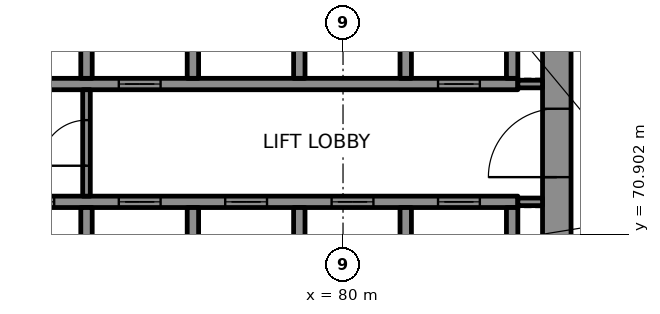
"""IFC4 building model, lengths in metres.
Left out: names, types, materials, properties, quantities, classifications, styles, units other than length and angle.
Written with IfcOpenShell. Run it as: python <this file> out.ifc"""

import sys

from ifc_helpers import new_model, si_unit, direction, frame, frame_2d, origin, place, context, subcontext, project, spatial, rectangle, extrude, element, fill, save


model = new_model("IFC4")
c1 = context("Model", 3, precision=1e-05, world=origin(), true_north=direction((0.0, 1.0)))
c2 = subcontext(c1, "Body", "Model", "MODEL_VIEW")
j1 = project(units=[si_unit("LENGTHUNIT", "METRE"), si_unit("PLANEANGLEUNIT", "RADIAN")], contexts=[c1])
p1 = place(None, origin())
s1 = spatial("IfcSite", under=j1, at=p1, CompositionType="ELEMENT")
p2 = place(p1, origin())
s2 = spatial("IfcBuilding", under=s1, at=p2, CompositionType="ELEMENT")
p3 = place(p2, frame((0.0, 0.0, 175.3)))
s3 = spatial("IfcBuildingStorey", under=s2, at=p3, CompositionType="ELEMENT", Elevation=175.3)
p4 = place(p3, frame((85.625, 67.75, 0.0), z_axis=(0.0, 0.0, 1.0), x_axis=(0.0, 1.0, 0.0)))
e1 = element("IfcWall", 1, at=p4, inside=s3, PredefinedType="SHEAR", context=c2, shape_type="SweptSolid", body=[
    extrude(rectangle(XDim=14.5, YDim=0.75, at=frame_2d((7.25, 0.0))), origin(), (0.0, 0.0, 1.0), 3.7),
])
p5 = place(p4, frame((4.65, 0.0, 0.0)))
e2 = element("IfcOpeningElement", 2, at=p5, cuts=e1, PredefinedType="OPENING", context=c2, shape_type="SweptSolid", body=[
    extrude(rectangle(XDim=1.8, YDim=2.1, at=frame_2d((0.9, 1.05))), frame((0.0, 0.385, 0.0), z_axis=(0.0, -1.0, 0.0), x_axis=(1.0, 0.0, 0.0)), (0.0, 0.0, 1.0), 0.77),
])
p6 = place(p4, frame((11.8, 0.0, 0.0)))
e3 = element("IfcOpeningElement", 3, at=p6, cuts=e1, PredefinedType="OPENING", context=c2, shape_type="SweptSolid", body=[
    extrude(rectangle(XDim=0.9, YDim=2.1, at=frame_2d((0.45, 1.05))), frame((0.0, 0.385, 0.0), z_axis=(0.0, -1.0, 0.0), x_axis=(1.0, 0.0, 0.0)), (0.0, 0.0, 1.0), 0.77),
])
p7 = place(p3, frame((70.3, 71.75, 0.0), z_axis=(0.0, 0.0, 1.0), x_axis=(1.0, 0.0, 0.0)))
e4 = element("IfcWall", 4, at=p7, inside=s3, PredefinedType="SHEAR", context=c2, shape_type="SweptSolid", body=[
    extrude(rectangle(XDim=14.3, YDim=0.3, at=frame_2d((7.15, 0.0))), origin(), (0.0, 0.0, 1.0), 3.7),
])
p8 = place(p7, frame((1.0, 0.0, 0.0)))
e5 = element("IfcOpeningElement", 5, at=p8, cuts=e4, PredefinedType="OPENING", context=c2, shape_type="SweptSolid", body=[
    extrude(rectangle(XDim=1.1, YDim=2.1, at=frame_2d((0.55, 1.05))), frame((0.0, 0.16, 0.0), z_axis=(0.0, -1.0, 0.0), x_axis=(1.0, 0.0, 0.0)), (0.0, 0.0, 1.0), 0.32),
])
p9 = place(p7, frame((3.8, 0.0, 0.0)))
e6 = element("IfcOpeningElement", 6, at=p9, cuts=e4, PredefinedType="OPENING", context=c2, shape_type="SweptSolid", body=[
    extrude(rectangle(XDim=1.1, YDim=2.1, at=frame_2d((0.55, 1.05))), frame((0.0, 0.16, 0.0), z_axis=(0.0, -1.0, 0.0), x_axis=(1.0, 0.0, 0.0)), (0.0, 0.0, 1.0), 0.32),
])
p10 = place(p7, frame((6.6, 0.0, 0.0)))
e7 = element("IfcOpeningElement", 7, at=p10, cuts=e4, PredefinedType="OPENING", context=c2, shape_type="SweptSolid", body=[
    extrude(rectangle(XDim=1.1, YDim=2.1, at=frame_2d((0.55, 1.05))), frame((0.0, 0.16, 0.0), z_axis=(0.0, -1.0, 0.0), x_axis=(1.0, 0.0, 0.0)), (0.0, 0.0, 1.0), 0.32),
])
p11 = place(p7, frame((9.4, 0.0, 0.0)))
e8 = element("IfcOpeningElement", 8, at=p11, cuts=e4, PredefinedType="OPENING", context=c2, shape_type="SweptSolid", body=[
    extrude(rectangle(XDim=1.1, YDim=2.1, at=frame_2d((0.55, 1.05))), frame((0.0, 0.16, 0.0), z_axis=(0.0, -1.0, 0.0), x_axis=(1.0, 0.0, 0.0)), (0.0, 0.0, 1.0), 0.32),
])
p12 = place(p7, frame((12.2, 0.0, 0.0)))
e9 = element("IfcOpeningElement", 9, at=p12, cuts=e4, PredefinedType="OPENING", context=c2, shape_type="SweptSolid", body=[
    extrude(rectangle(XDim=1.1, YDim=2.1, at=frame_2d((0.55, 1.05))), frame((0.0, 0.16, 0.0), z_axis=(0.0, -1.0, 0.0), x_axis=(1.0, 0.0, 0.0)), (0.0, 0.0, 1.0), 0.32),
])
p13 = place(p3, frame((70.3, 74.85, 0.0), z_axis=(0.0, 0.0, 1.0), x_axis=(1.0, 0.0, 0.0)))
e10 = element("IfcWall", 10, at=p13, inside=s3, PredefinedType="SHEAR", context=c2, shape_type="SweptSolid", body=[
    extrude(rectangle(XDim=14.3, YDim=0.3, at=frame_2d((7.15, 0.0))), origin(), (0.0, 0.0, 1.0), 3.7),
])
p14 = place(p13, frame((3.8, 0.0, 0.0)))
e11 = element("IfcOpeningElement", 11, at=p14, cuts=e10, PredefinedType="OPENING", context=c2, shape_type="SweptSolid", body=[
    extrude(rectangle(XDim=1.1, YDim=2.1, at=frame_2d((0.55, 1.05))), frame((0.0, 0.16, 0.0), z_axis=(0.0, -1.0, 0.0), x_axis=(1.0, 0.0, 0.0)), (0.0, 0.0, 1.0), 0.32),
])
p15 = place(p13, frame((12.2, 0.0, 0.0)))
e12 = element("IfcOpeningElement", 12, at=p15, cuts=e10, PredefinedType="OPENING", context=c2, shape_type="SweptSolid", body=[
    extrude(rectangle(XDim=1.1, YDim=2.1, at=frame_2d((0.55, 1.05))), frame((0.0, 0.16, 0.0), z_axis=(0.0, -1.0, 0.0), x_axis=(1.0, 0.0, 0.0)), (0.0, 0.0, 1.0), 0.32),
])
for number, where, z_axis, x_axis in (
    (13, (73.25, 69.0, 0.0), (0.0, 0.0, 1.0), (0.0, 1.0, 0.0)),
    (14, (73.25, 75.0, 0.0), (0.0, 0.0, 1.0), (0.0, 1.0, 0.0)),
    (15, (76.05, 69.0, 0.0), (0.0, 0.0, 1.0), (0.0, 1.0, 0.0)),
    (16, (76.05, 75.0, 0.0), (0.0, 0.0, 1.0), (0.0, 1.0, 0.0)),
    (17, (78.85, 69.0, 0.0), (0.0, 0.0, 1.0), (0.0, 1.0, 0.0)),
    (18, (78.85, 75.0, 0.0), (0.0, 0.0, 1.0), (0.0, 1.0, 0.0)),
    (19, (81.65, 69.0, 0.0), (0.0, 0.0, 1.0), (0.0, 1.0, 0.0)),
    (20, (81.65, 75.0, 0.0), (0.0, 0.0, 1.0), (0.0, 1.0, 0.0)),
    (21, (84.45, 69.0, 0.0), (0.0, 0.0, 1.0), (0.0, 1.0, 0.0)),
    (22, (84.45, 75.0, 0.0), (0.0, 0.0, 1.0), (0.0, 1.0, 0.0)),
):
    element("IfcWall", number, at=place(p3, frame(where, z_axis=z_axis, x_axis=x_axis)), inside=s3, PredefinedType="SHEAR", context=c2, shape_type="SweptSolid", body=[
        extrude(rectangle(XDim=2.6, YDim=0.3, at=frame_2d((1.3, 0.0))), origin(), (0.0, 0.0, 1.0), 3.7),
    ])
for number, where, z_axis, x_axis in (
    (23, (84.6, 71.75, 0.0), (0.0, 0.0, 1.0), (1.0, 0.0, 0.0)),
    (24, (84.6, 74.85, 0.0), (0.0, 0.0, 1.0), (1.0, 0.0, 0.0)),
):
    element("IfcWall", number, at=place(p3, frame(where, z_axis=z_axis, x_axis=x_axis)), inside=s3, PredefinedType="PARTITIONING", context=c2, shape_type="SweptSolid", body=[
        extrude(rectangle(XDim=0.65, YDim=0.2, at=frame_2d((0.325, 0.0))), origin(), (0.0, 0.0, 1.0), 3.7),
    ])
p16 = place(p3, frame((73.25, 71.9, 0.0), z_axis=(0.0, 0.0, 1.0), x_axis=(0.0, 1.0, 0.0)))
e25 = element("IfcWall", 25, at=p16, inside=s3, PredefinedType="PARTITIONING", context=c2, shape_type="SweptSolid", body=[
    extrude(rectangle(XDim=2.8, YDim=0.2, at=frame_2d((1.4, 0.0))), origin(), (0.0, 0.0, 1.0), 3.7),
])
p17 = place(p16, frame((0.8, 0.0, 0.0)))
e26 = element("IfcOpeningElement", 26, at=p17, cuts=e25, PredefinedType="OPENING", context=c2, shape_type="SweptSolid", body=[
    extrude(rectangle(XDim=1.2, YDim=2.1, at=frame_2d((0.6, 1.05))), frame((0.0, 0.11, 0.0), z_axis=(0.0, -1.0, 0.0), x_axis=(1.0, 0.0, 0.0)), (0.0, 0.0, 1.0), 0.22),
])
p18 = place(p8, origin())
e27 = element("IfcDoor", 27, at=p18, inside=s3, OperationType="DOUBLE_DOOR_SLIDING", PredefinedType="DOOR", context=c2, shape_type="SweptSolid", body=[
    extrude(rectangle(XDim=1.1, YDim=2.1, at=frame_2d((0.55, 1.05))), frame((0.0, 0.025, 0.0), z_axis=(0.0, -1.0, 0.0), x_axis=(1.0, 0.0, 0.0)), (0.0, 0.0, 1.0), 0.05),
])
fill(e5, e27)
p19 = place(p9, origin())
e28 = element("IfcDoor", 28, at=p19, inside=s3, OperationType="DOUBLE_DOOR_SLIDING", PredefinedType="DOOR", context=c2, shape_type="SweptSolid", body=[
    extrude(rectangle(XDim=1.1, YDim=2.1, at=frame_2d((0.55, 1.05))), frame((0.0, 0.025, 0.0), z_axis=(0.0, -1.0, 0.0), x_axis=(1.0, 0.0, 0.0)), (0.0, 0.0, 1.0), 0.05),
])
fill(e6, e28)
p20 = place(p10, origin())
e29 = element("IfcDoor", 29, at=p20, inside=s3, OperationType="DOUBLE_DOOR_SLIDING", PredefinedType="DOOR", context=c2, shape_type="SweptSolid", body=[
    extrude(rectangle(XDim=1.1, YDim=2.1, at=frame_2d((0.55, 1.05))), frame((0.0, 0.025, 0.0), z_axis=(0.0, -1.0, 0.0), x_axis=(1.0, 0.0, 0.0)), (0.0, 0.0, 1.0), 0.05),
])
fill(e7, e29)
p21 = place(p11, origin())
e30 = element("IfcDoor", 30, at=p21, inside=s3, OperationType="DOUBLE_DOOR_SLIDING", PredefinedType="DOOR", context=c2, shape_type="SweptSolid", body=[
    extrude(rectangle(XDim=1.1, YDim=2.1, at=frame_2d((0.55, 1.05))), frame((0.0, 0.025, 0.0), z_axis=(0.0, -1.0, 0.0), x_axis=(1.0, 0.0, 0.0)), (0.0, 0.0, 1.0), 0.05),
])
fill(e8, e30)
p22 = place(p12, origin())
e31 = element("IfcDoor", 31, at=p22, inside=s3, OperationType="DOUBLE_DOOR_SLIDING", PredefinedType="DOOR", context=c2, shape_type="SweptSolid", body=[
    extrude(rectangle(XDim=1.1, YDim=2.1, at=frame_2d((0.55, 1.05))), frame((0.0, 0.025, 0.0), z_axis=(0.0, -1.0, 0.0), x_axis=(1.0, 0.0, 0.0)), (0.0, 0.0, 1.0), 0.05),
])
fill(e9, e31)
p23 = place(p14, origin())
e32 = element("IfcDoor", 32, at=p23, inside=s3, OperationType="DOUBLE_DOOR_SLIDING", PredefinedType="DOOR", context=c2, shape_type="SweptSolid", body=[
    extrude(rectangle(XDim=1.1, YDim=2.1, at=frame_2d((0.55, 1.05))), frame((0.0, 0.025, 0.0), z_axis=(0.0, -1.0, 0.0), x_axis=(1.0, 0.0, 0.0)), (0.0, 0.0, 1.0), 0.05),
])
fill(e11, e32)
p24 = place(p15, origin())
e33 = element("IfcDoor", 33, at=p24, inside=s3, OperationType="DOUBLE_DOOR_SLIDING", PredefinedType="DOOR", context=c2, shape_type="SweptSolid", body=[
    extrude(rectangle(XDim=1.1, YDim=2.1, at=frame_2d((0.55, 1.05))), frame((0.0, 0.025, 0.0), z_axis=(0.0, -1.0, 0.0), x_axis=(1.0, 0.0, 0.0)), (0.0, 0.0, 1.0), 0.05),
])
fill(e12, e33)
p25 = place(p17, origin())
e34 = element("IfcDoor", 34, at=p25, inside=s3, OperationType="SINGLE_SWING_LEFT", PredefinedType="DOOR", context=c2, shape_type="SweptSolid", body=[
    extrude(rectangle(XDim=1.2, YDim=2.1, at=frame_2d((0.6, 1.05))), frame((0.0, 0.025, 0.0), z_axis=(0.0, -1.0, 0.0), x_axis=(1.0, 0.0, 0.0)), (0.0, 0.0, 1.0), 0.05),
])
fill(e26, e34)
p26 = place(p5, origin())
e35 = element("IfcDoor", 35, at=p26, inside=s3, OperationType="SINGLE_SWING_RIGHT", PredefinedType="DOOR", context=c2, shape_type="SweptSolid", body=[
    extrude(rectangle(XDim=1.8, YDim=2.1, at=frame_2d((0.9, 1.05))), frame((0.0, 0.095, 0.0), z_axis=(0.0, -1.0, 0.0), x_axis=(1.0, 0.0, 0.0)), (0.0, 0.0, 1.0), 0.19),
])
fill(e2, e35)
save(model, sys.argv[1])
